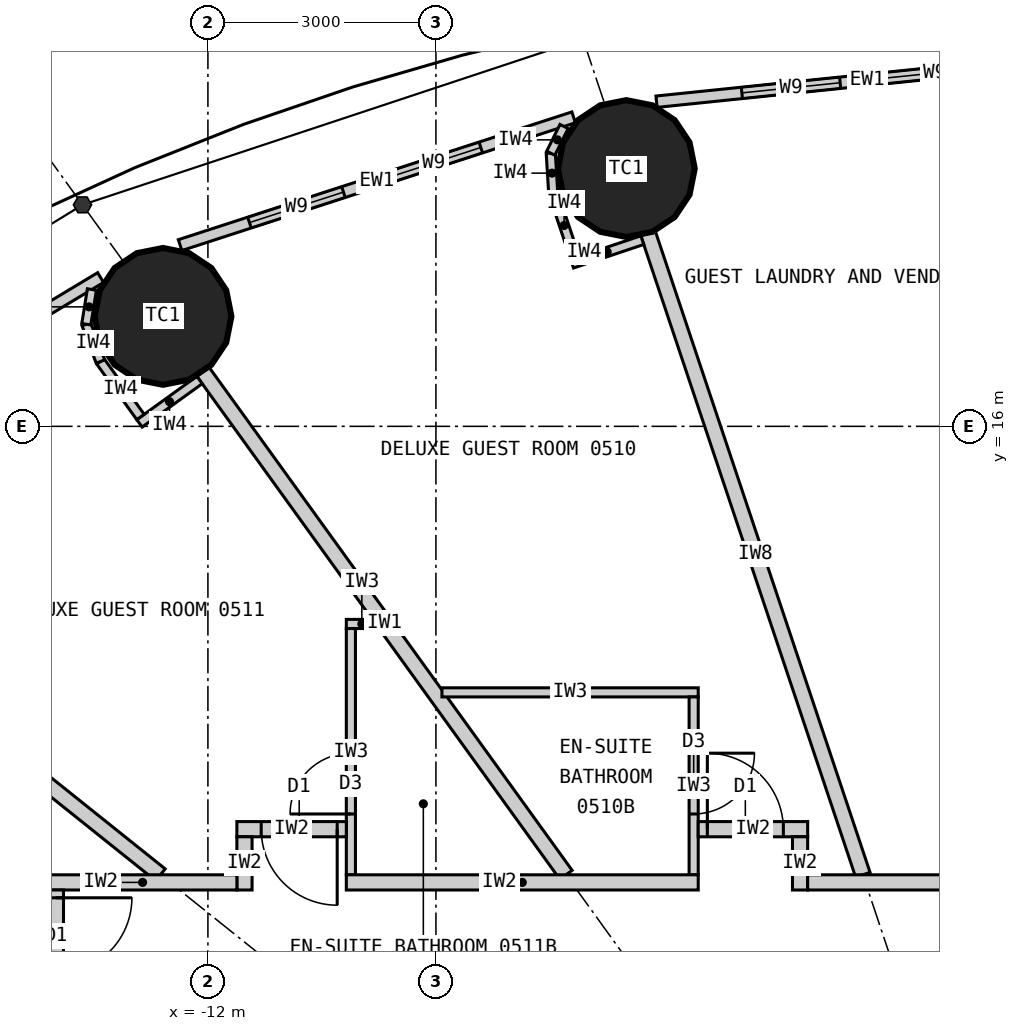
"""IFC4 building model, lengths in metres.
Left out: names, types, materials, properties, quantities, classifications, styles, units other than length and angle.
Written with IfcOpenShell. Run it as: python <this file> out.ifc"""

import sys

from ifc_helpers import new_model, si_unit, direction, frame, frame_2d, origin, origin_2d, place, context, subcontext, project, spatial, rectangle, circle, extrude, element, fill, save


model = new_model("IFC4")
c1 = context("Model", 3, precision=1e-05, world=origin(), true_north=direction((0.0, 1.0)))
c2 = subcontext(c1, "Body", "Model", "MODEL_VIEW")
j1 = project(units=[si_unit("LENGTHUNIT", "METRE"), si_unit("PLANEANGLEUNIT", "RADIAN")], contexts=[c1])
p1 = place(None, origin())
s1 = spatial("IfcSite", under=j1, at=p1, CompositionType="ELEMENT")
p2 = place(p1, origin())
s2 = spatial("IfcBuilding", under=s1, at=p2, CompositionType="ELEMENT")
p3 = place(p2, frame((0.0, 0.0, 29.4)))
s3 = spatial("IfcBuildingStorey", under=s2, at=p3, CompositionType="ELEMENT", Elevation=29.4)
for number, where, z_axis, x_axis in (
    (1, (-6.495, 19.391, 0.0), (0.0, 0.0, 1.0), (1.0, 0.0, 0.0)),
    (2, (-12.591, 17.447, 0.0), (0.0, 0.0, 1.0), (1.0, 0.0, 0.0)),
):
    element("IfcColumn", number, at=place(p3, frame(where, z_axis=z_axis, x_axis=x_axis)), inside=s3, PredefinedType="COLUMN", context=c2, shape_type="SweptSolid", body=[
        extrude(circle(Radius=0.9, at=origin_2d()), origin(), (0.0, 0.0, 1.0), 3.3),
    ])
p4 = place(p3, frame((-0.551, 20.843, 0.0), z_axis=(0.0, 0.0, 1.0), x_axis=(-0.994723735084, -0.102589915983, 0.0)))
e3 = element("IfcWall", 3, at=p4, inside=s3, PredefinedType="ELEMENTEDWALL", context=c2, shape_type="SweptSolid", body=[
    extrude(rectangle(XDim=5.576, YDim=0.15, at=frame_2d((2.788, 0.0))), origin(), (0.0, 0.0, 1.0), 3.12),
])
p5 = place(p4, frame((1.247, 0.0, 0.9)))
e4 = element("IfcOpeningElement", 4, at=p5, cuts=e3, PredefinedType="OPENING", context=c2, shape_type="SweptSolid", body=[
    extrude(rectangle(XDim=1.3, YDim=1.9, at=frame_2d((0.65, 0.95))), frame((0.0, 0.085, 0.0), z_axis=(0.0, -1.0, 0.0), x_axis=(1.0, 0.0, 0.0)), (0.0, 0.0, 1.0), 0.17),
])
p6 = place(p4, frame((3.147, 0.0, 0.9)))
e5 = element("IfcOpeningElement", 5, at=p6, cuts=e3, PredefinedType="OPENING", context=c2, shape_type="SweptSolid", body=[
    extrude(rectangle(XDim=1.3, YDim=1.9, at=frame_2d((0.65, 0.95))), frame((0.0, 0.085, 0.0), z_axis=(0.0, -1.0, 0.0), x_axis=(1.0, 0.0, 0.0)), (0.0, 0.0, 1.0), 0.17),
])
p7 = place(p3, frame((-7.188, 20.065, 0.0), z_axis=(0.0, 0.0, 1.0), x_axis=(-0.951138486029, -0.308764603532, 0.0)))
e6 = element("IfcWall", 6, at=p7, inside=s3, PredefinedType="ELEMENTEDWALL", context=c2, shape_type="SweptSolid", body=[
    extrude(rectangle(XDim=5.444, YDim=0.15, at=frame_2d((2.722, 0.0))), origin(), (0.0, 0.0, 1.0), 3.12),
])
p8 = place(p7, frame((1.284, 0.0, 0.9)))
e7 = element("IfcOpeningElement", 7, at=p8, cuts=e6, PredefinedType="OPENING", context=c2, shape_type="SweptSolid", body=[
    extrude(rectangle(XDim=1.3, YDim=1.9, at=frame_2d((0.65, 0.95))), frame((0.0, 0.085, 0.0), z_axis=(0.0, -1.0, 0.0), x_axis=(1.0, 0.0, 0.0)), (0.0, 0.0, 1.0), 0.17),
])
p9 = place(p7, frame((3.184, 0.0, 0.9)))
e8 = element("IfcOpeningElement", 8, at=p9, cuts=e6, PredefinedType="OPENING", context=c2, shape_type="SweptSolid", body=[
    extrude(rectangle(XDim=1.3, YDim=1.9, at=frame_2d((0.65, 0.95))), frame((0.0, 0.085, 0.0), z_axis=(0.0, -1.0, 0.0), x_axis=(1.0, 0.0, 0.0)), (0.0, 0.0, 1.0), 0.17),
])
p10 = place(p3, frame((-13.412, 17.957, 0.0), z_axis=(0.0, 0.0, 1.0), x_axis=(-0.856958191554, -0.515385931054, 0.0)))
e9 = element("IfcWall", 9, at=p10, inside=s3, PredefinedType="ELEMENTEDWALL", context=c2, shape_type="SweptSolid", body=[
    extrude(rectangle(XDim=5.201, YDim=0.15, at=frame_2d((2.601, 0.0))), origin(), (0.0, 0.0, 1.0), 3.12),
])
p11 = place(p10, frame((1.225, 0.0, 0.9)))
e10 = element("IfcOpeningElement", 10, at=p11, cuts=e9, PredefinedType="OPENING", context=c2, shape_type="SweptSolid", body=[
    extrude(rectangle(XDim=1.3, YDim=1.9, at=frame_2d((0.65, 0.95))), frame((0.0, 0.085, 0.0), z_axis=(0.0, -1.0, 0.0), x_axis=(1.0, 0.0, 0.0)), (0.0, 0.0, 1.0), 0.17),
])
p12 = place(p10, frame((3.125, 0.0, 0.9)))
e11 = element("IfcOpeningElement", 11, at=p12, cuts=e9, PredefinedType="OPENING", context=c2, shape_type="SweptSolid", body=[
    extrude(rectangle(XDim=1.3, YDim=1.9, at=frame_2d((0.65, 0.95))), frame((0.0, 0.085, 0.0), z_axis=(0.0, -1.0, 0.0), x_axis=(1.0, 0.0, 0.0)), (0.0, 0.0, 1.0), 0.17),
])
p13 = place(p3, frame((-3.383, 10.1, 0.0), z_axis=(0.0, 0.0, 1.0), x_axis=(-0.317593727596, 0.948226884344, 0.0)))
e12 = element("IfcWall", 12, at=p13, inside=s3, PredefinedType="PARTITIONING", context=c2, shape_type="SweptSolid", body=[
    extrude(rectangle(XDim=8.899, YDim=0.2, at=frame_2d((4.449, 0.0))), origin(), (0.0, 0.0, 1.0), 2.32),
])
p14 = place(p3, frame((-7.289, 10.1, 0.0), z_axis=(0.0, 0.0, 1.0), x_axis=(-0.585216319319, 0.810877216108, 0.0)))
e13 = element("IfcWall", 13, at=p14, inside=s3, PredefinedType="PARTITIONING", context=c2, shape_type="SweptSolid", body=[
    extrude(rectangle(XDim=8.16, YDim=0.2, at=frame_2d((4.08, 0.0))), origin(), (0.0, 0.0, 1.0), 2.32),
])
p15 = place(p3, frame((-12.625, 10.1, 0.0), z_axis=(0.0, 0.0, 1.0), x_axis=(-0.780872884676, 0.624689953479, 0.0)))
e14 = element("IfcWall", 14, at=p15, inside=s3, PredefinedType="PARTITIONING", context=c2, shape_type="SweptSolid", body=[
    extrude(rectangle(XDim=5.845, YDim=0.2, at=frame_2d((2.922, 0.0))), origin(), (0.0, 0.0, 1.0), 2.32),
])
p16 = place(p3, frame((-8.921, 12.5, 0.0), z_axis=(0.0, 0.0, 1.0), x_axis=(1.0, 0.0, 0.0)))
e15 = element("IfcWall", 15, at=p16, inside=s3, PredefinedType="PARTITIONING", context=c2, shape_type="SweptSolid", body=[
    extrude(rectangle(XDim=3.372, YDim=0.12, at=frame_2d((1.686, 0.0))), origin(), (0.0, 0.0, 1.0), 3.12),
])
p17 = place(p3, frame((-5.609, 10.1, 0.0), z_axis=(0.0, 0.0, 1.0), x_axis=(0.0, 1.0, 0.0)))
e16 = element("IfcWall", 16, at=p17, inside=s3, PredefinedType="PARTITIONING", context=c2, shape_type="SweptSolid", body=[
    extrude(rectangle(XDim=2.34, YDim=0.12, at=frame_2d((1.17, 0.0))), origin(), (0.0, 0.0, 1.0), 3.12),
])
p18 = place(p17, frame((0.8, 0.0, 0.0)))
e17 = element("IfcOpeningElement", 17, at=p18, cuts=e16, PredefinedType="OPENING", context=c2, shape_type="SweptSolid", body=[
    extrude(rectangle(XDim=0.8, YDim=2.1, at=frame_2d((0.4, 1.05))), frame((0.0, 0.07, 0.0), z_axis=(0.0, -1.0, 0.0), x_axis=(1.0, 0.0, 0.0)), (0.0, 0.0, 1.0), 0.14),
])
p19 = place(p3, frame((-9.771, 13.4, 0.0), z_axis=(0.0, 0.0, 1.0), x_axis=(-1.0, 0.0, 0.0)))
e18 = element("IfcWall", 18, at=p19, inside=s3, PredefinedType="PARTITIONING", context=c2, shape_type="SweptSolid", body=[
    extrude(rectangle(XDim=0.408, YDim=0.12, at=frame_2d((0.204, 0.0))), origin(), (0.0, 0.0, 1.0), 3.12),
])
p20 = place(p3, frame((-10.119, 10.1, 0.0), z_axis=(0.0, 0.0, 1.0), x_axis=(0.0, 1.0, 0.0)))
e19 = element("IfcWall", 19, at=p20, inside=s3, PredefinedType="PARTITIONING", context=c2, shape_type="SweptSolid", body=[
    extrude(rectangle(XDim=3.24, YDim=0.12, at=frame_2d((1.62, 0.0))), origin(), (0.0, 0.0, 1.0), 3.12),
])
p21 = place(p20, frame((0.8, 0.0, 0.0)))
e20 = element("IfcOpeningElement", 20, at=p21, cuts=e19, PredefinedType="OPENING", context=c2, shape_type="SweptSolid", body=[
    extrude(rectangle(XDim=0.8, YDim=2.1, at=frame_2d((0.4, 1.05))), frame((0.0, 0.07, 0.0), z_axis=(0.0, -1.0, 0.0), x_axis=(1.0, 0.0, 0.0)), (0.0, 0.0, 1.0), 0.14),
])
p22 = place(p3, frame((-5.549, 10.7, 0.0), z_axis=(0.0, 0.0, 1.0), x_axis=(1.0, 0.0, 0.0)))
e21 = element("IfcWall", 21, at=p22, inside=s3, PredefinedType="PARTITIONING", context=c2, shape_type="SweptSolid", body=[
    extrude(rectangle(XDim=1.44, YDim=0.2, at=frame_2d((0.72, 0.0))), origin(), (0.0, 0.0, 1.0), 3.12),
])
p23 = place(p22, frame((0.12, 0.0, 0.0)))
e22 = element("IfcOpeningElement", 22, at=p23, cuts=e21, PredefinedType="OPENING", context=c2, shape_type="SweptSolid", body=[
    extrude(rectangle(XDim=1.0, YDim=2.2, at=frame_2d((0.5, 1.1))), frame((0.0, 0.11, 0.0), z_axis=(0.0, -1.0, 0.0), x_axis=(1.0, 0.0, 0.0)), (0.0, 0.0, 1.0), 0.22),
])
p24 = place(p3, frame((-4.209, 9.9, 0.0), z_axis=(0.0, 0.0, 1.0), x_axis=(0.0, 1.0, 0.0)))
e23 = element("IfcWall", 23, at=p24, inside=s3, PredefinedType="PARTITIONING", context=c2, shape_type="SweptSolid", body=[
    extrude(rectangle(XDim=0.7, YDim=0.2, at=frame_2d((0.35, 0.0))), origin(), (0.0, 0.0, 1.0), 3.12),
])
p25 = place(p3, frame((-11.619, 10.7, 0.0), z_axis=(0.0, 0.0, 1.0), x_axis=(1.0, 0.0, 0.0)))
e24 = element("IfcWall", 24, at=p25, inside=s3, PredefinedType="PARTITIONING", context=c2, shape_type="SweptSolid", body=[
    extrude(rectangle(XDim=1.44, YDim=0.2, at=frame_2d((0.72, 0.0))), origin(), (0.0, 0.0, 1.0), 3.12),
])
p26 = place(p25, frame((0.32, 0.0, 0.0)))
e25 = element("IfcOpeningElement", 25, at=p26, cuts=e24, PredefinedType="OPENING", context=c2, shape_type="SweptSolid", body=[
    extrude(rectangle(XDim=1.0, YDim=2.2, at=frame_2d((0.5, 1.1))), frame((0.0, 0.11, 0.0), z_axis=(0.0, -1.0, 0.0), x_axis=(1.0, 0.0, 0.0)), (0.0, 0.0, 1.0), 0.22),
])
p27 = place(p3, frame((-11.519, 9.9, 0.0), z_axis=(0.0, 0.0, 1.0), x_axis=(0.0, 1.0, 0.0)))
e26 = element("IfcWall", 26, at=p27, inside=s3, PredefinedType="PARTITIONING", context=c2, shape_type="SweptSolid", body=[
    extrude(rectangle(XDim=0.7, YDim=0.2, at=frame_2d((0.35, 0.0))), origin(), (0.0, 0.0, 1.0), 3.12),
])
p28 = place(p3, frame((-14.1, 10.0, 0.0), z_axis=(0.0, 0.0, 1.0), x_axis=(1.0, 0.0, 0.0)))
e27 = element("IfcWall", 27, at=p28, inside=s3, PredefinedType="PARTITIONING", context=c2, shape_type="SweptSolid", body=[
    extrude(rectangle(XDim=2.481, YDim=0.2, at=frame_2d((1.24, 0.0))), origin(), (0.0, 0.0, 1.0), 3.12),
])
p29 = place(p3, frame((-10.179, 10.0, 0.0), z_axis=(0.0, 0.0, 1.0), x_axis=(1.0, 0.0, 0.0)))
e28 = element("IfcWall", 28, at=p29, inside=s3, PredefinedType="PARTITIONING", context=c2, shape_type="SweptSolid", body=[
    extrude(rectangle(XDim=4.63, YDim=0.2, at=frame_2d((2.315, 0.0))), origin(), (0.0, 0.0, 1.0), 3.12),
])
p30 = place(p3, frame((-4.109, 10.0, 0.0), z_axis=(0.0, 0.0, 1.0), x_axis=(1.0, 0.0, 0.0)))
e29 = element("IfcWall", 29, at=p30, inside=s3, PredefinedType="PARTITIONING", context=c2, shape_type="SweptSolid", body=[
    extrude(rectangle(XDim=4.312, YDim=0.2, at=frame_2d((2.156, 0.0))), origin(), (0.0, 0.0, 1.0), 3.12),
])
p31 = place(p30, frame((2.689, 0.0, 0.0)))
e30 = element("IfcOpeningElement", 30, at=p31, cuts=e29, PredefinedType="OPENING", context=c2, shape_type="SweptSolid", body=[
    extrude(rectangle(XDim=1.0, YDim=2.2, at=frame_2d((0.5, 1.1))), frame((0.0, 0.11, 0.0), z_axis=(0.0, -1.0, 0.0), x_axis=(1.0, 0.0, 0.0)), (0.0, 0.0, 1.0), 0.22),
])
p32 = place(p3, frame((-14.0, 9.9, 0.0), z_axis=(0.0, 0.0, 1.0), x_axis=(0.0, -1.0, 0.0)))
e31 = element("IfcWall", 31, at=p32, inside=s3, PredefinedType="PARTITIONING", context=c2, shape_type="SweptSolid", body=[
    extrude(rectangle(XDim=5.127, YDim=0.2, at=frame_2d((2.564, 0.0))), origin(), (0.0, 0.0, 1.0), 3.12),
])
p33 = place(p32, frame((0.103, 0.0, 0.0)))
e32 = element("IfcOpeningElement", 32, at=p33, cuts=e31, PredefinedType="OPENING", context=c2, shape_type="SweptSolid", body=[
    extrude(rectangle(XDim=1.0, YDim=2.2, at=frame_2d((0.5, 1.1))), frame((0.0, 0.11, 0.0), z_axis=(0.0, -1.0, 0.0), x_axis=(1.0, 0.0, 0.0)), (0.0, 0.0, 1.0), 0.22),
])
p34 = place(p3, frame((-6.285, 18.449, 0.0), z_axis=(0.0, 0.0, 1.0), x_axis=(-0.948281677008, -0.317430088446, 0.0)))
e33 = element("IfcWall", 33, at=p34, inside=s3, PredefinedType="PARTITIONING", context=c2, shape_type="SweptSolid", body=[
    extrude(rectangle(XDim=0.974, YDim=0.12, at=frame_2d((0.487, 0.0))), origin(), (0.0, 0.0, 1.0), 3.12),
])
p35 = place(p3, frame((-7.171, 18.216, 0.0), z_axis=(0.0, 0.0, 1.0), x_axis=(-0.317692409458, 0.94819382669, 0.0)))
e34 = element("IfcWall", 34, at=p35, inside=s3, PredefinedType="PARTITIONING", context=c2, shape_type="SweptSolid", body=[
    extrude(rectangle(XDim=0.9, YDim=0.12, at=frame_2d((0.45, 0.0))), origin(), (0.0, 0.0, 1.0), 3.12),
])
p36 = place(p3, frame((-7.457, 19.069, 0.0), z_axis=(0.0, 0.0, 1.0), x_axis=(-0.061365267648, 0.99811537606, 0.0)))
e35 = element("IfcWall", 35, at=p36, inside=s3, PredefinedType="PARTITIONING", context=c2, shape_type="SweptSolid", body=[
    extrude(rectangle(XDim=0.525, YDim=0.12, at=frame_2d((0.263, 0.0))), origin(), (0.0, 0.0, 1.0), 3.12),
])
p37 = place(p3, frame((-7.489, 19.593, 0.0), z_axis=(0.0, 0.0, 1.0), x_axis=(0.446218959337, 0.89492381817, 0.0)))
e36 = element("IfcWall", 36, at=p37, inside=s3, PredefinedType="PARTITIONING", context=c2, shape_type="SweptSolid", body=[
    extrude(rectangle(XDim=0.393, YDim=0.12, at=frame_2d((0.196, 0.0))), origin(), (0.0, 0.0, 1.0), 3.12),
])
p38 = place(p3, frame((-12.11, 16.609, 0.0), z_axis=(0.0, 0.0, 1.0), x_axis=(-0.810897160646, -0.585188683123, 0.0)))
e37 = element("IfcWall", 37, at=p38, inside=s3, PredefinedType="PARTITIONING", context=c2, shape_type="SweptSolid", body=[
    extrude(rectangle(XDim=0.975, YDim=0.12, at=frame_2d((0.487, 0.0))), origin(), (0.0, 0.0, 1.0), 3.12),
])
p39 = place(p3, frame((-12.887, 16.123, 0.0), z_axis=(0.0, 0.0, 1.0), x_axis=(-0.585054732094, 0.810993810367, 0.0)))
e38 = element("IfcWall", 38, at=p39, inside=s3, PredefinedType="PARTITIONING", context=c2, shape_type="SweptSolid", body=[
    extrude(rectangle(XDim=0.9, YDim=0.12, at=frame_2d((0.45, 0.0))), origin(), (0.0, 0.0, 1.0), 3.12),
])
p40 = place(p3, frame((-13.414, 16.853, 0.0), z_axis=(0.0, 0.0, 1.0), x_axis=(-0.355705277023, 0.934598178844, 0.0)))
e39 = element("IfcWall", 39, at=p40, inside=s3, PredefinedType="PARTITIONING", context=c2, shape_type="SweptSolid", body=[
    extrude(rectangle(XDim=0.525, YDim=0.12, at=frame_2d((0.263, 0.0))), origin(), (0.0, 0.0, 1.0), 3.12),
])
p41 = place(p3, frame((-13.6, 17.344, 0.0), z_axis=(0.0, 0.0, 1.0), x_axis=(0.15994604532, 0.987125758243, 0.0)))
e40 = element("IfcWall", 40, at=p41, inside=s3, PredefinedType="PARTITIONING", context=c2, shape_type="SweptSolid", body=[
    extrude(rectangle(XDim=0.462, YDim=0.12, at=frame_2d((0.231, 0.0))), origin(), (0.0, 0.0, 1.0), 3.12),
])
p42 = place(p5, origin())
e41 = element("IfcWindow", 41, at=p42, inside=s3, PartitioningType="SINGLE_PANEL", PredefinedType="WINDOW", context=c2, shape_type="SweptSolid", body=[
    extrude(rectangle(XDim=1.3, YDim=1.9, at=frame_2d((0.65, 0.95))), frame((0.0, 0.03, 0.0), z_axis=(0.0, -1.0, 0.0), x_axis=(1.0, 0.0, 0.0)), (0.0, 0.0, 1.0), 0.06),
])
fill(e4, e41)
p43 = place(p6, origin())
e42 = element("IfcWindow", 42, at=p43, inside=s3, PartitioningType="SINGLE_PANEL", PredefinedType="WINDOW", context=c2, shape_type="SweptSolid", body=[
    extrude(rectangle(XDim=1.3, YDim=1.9, at=frame_2d((0.65, 0.95))), frame((0.0, 0.03, 0.0), z_axis=(0.0, -1.0, 0.0), x_axis=(1.0, 0.0, 0.0)), (0.0, 0.0, 1.0), 0.06),
])
fill(e5, e42)
p44 = place(p8, origin())
e43 = element("IfcWindow", 43, at=p44, inside=s3, PartitioningType="SINGLE_PANEL", PredefinedType="WINDOW", context=c2, shape_type="SweptSolid", body=[
    extrude(rectangle(XDim=1.3, YDim=1.9, at=frame_2d((0.65, 0.95))), frame((0.0, 0.03, 0.0), z_axis=(0.0, -1.0, 0.0), x_axis=(1.0, 0.0, 0.0)), (0.0, 0.0, 1.0), 0.06),
])
fill(e7, e43)
p45 = place(p9, origin())
e44 = element("IfcWindow", 44, at=p45, inside=s3, PartitioningType="SINGLE_PANEL", PredefinedType="WINDOW", context=c2, shape_type="SweptSolid", body=[
    extrude(rectangle(XDim=1.3, YDim=1.9, at=frame_2d((0.65, 0.95))), frame((0.0, 0.03, 0.0), z_axis=(0.0, -1.0, 0.0), x_axis=(1.0, 0.0, 0.0)), (0.0, 0.0, 1.0), 0.06),
])
fill(e8, e44)
p46 = place(p18, origin())
e45 = element("IfcDoor", 45, at=p46, inside=s3, OperationType="SINGLE_SWING_RIGHT", PredefinedType="DOOR", context=c2, shape_type="SweptSolid", body=[
    extrude(rectangle(XDim=0.8, YDim=2.1, at=frame_2d((0.4, 1.05))), frame((0.0, 0.025, 0.0), z_axis=(0.0, -1.0, 0.0), x_axis=(1.0, 0.0, 0.0)), (0.0, 0.0, 1.0), 0.05),
])
fill(e17, e45)
p47 = place(p23, origin())
e46 = element("IfcDoor", 46, at=p47, inside=s3, OperationType="SINGLE_SWING_LEFT", PredefinedType="DOOR", context=c2, shape_type="SweptSolid", body=[
    extrude(rectangle(XDim=1.0, YDim=2.2, at=frame_2d((0.5, 1.1))), frame((0.0, 0.025, 0.0), z_axis=(0.0, -1.0, 0.0), x_axis=(1.0, 0.0, 0.0)), (0.0, 0.0, 1.0), 0.05),
])
fill(e22, e46)
p48 = place(p21, origin())
e47 = element("IfcDoor", 47, at=p48, inside=s3, OperationType="SINGLE_SWING_LEFT", PredefinedType="DOOR", context=c2, shape_type="SweptSolid", body=[
    extrude(rectangle(XDim=0.8, YDim=2.1, at=frame_2d((0.4, 1.05))), frame((0.0, 0.025, 0.0), z_axis=(0.0, -1.0, 0.0), x_axis=(1.0, 0.0, 0.0)), (0.0, 0.0, 1.0), 0.05),
])
fill(e20, e47)
p49 = place(p26, origin())
e48 = element("IfcDoor", 48, at=p49, inside=s3, OperationType="SINGLE_SWING_RIGHT", PredefinedType="DOOR", context=c2, shape_type="SweptSolid", body=[
    extrude(rectangle(XDim=1.0, YDim=2.2, at=frame_2d((0.5, 1.1))), frame((0.0, 0.025, 0.0), z_axis=(0.0, -1.0, 0.0), x_axis=(1.0, 0.0, 0.0)), (0.0, 0.0, 1.0), 0.05),
])
fill(e25, e48)
p50 = place(p33, origin())
e49 = element("IfcDoor", 49, at=p50, inside=s3, OperationType="SINGLE_SWING_LEFT", PredefinedType="DOOR", context=c2, shape_type="SweptSolid", body=[
    extrude(rectangle(XDim=1.0, YDim=2.2, at=frame_2d((0.5, 1.1))), frame((0.0, 0.025, 0.0), z_axis=(0.0, -1.0, 0.0), x_axis=(1.0, 0.0, 0.0)), (0.0, 0.0, 1.0), 0.05),
])
fill(e32, e49)
save(model, sys.argv[1])
